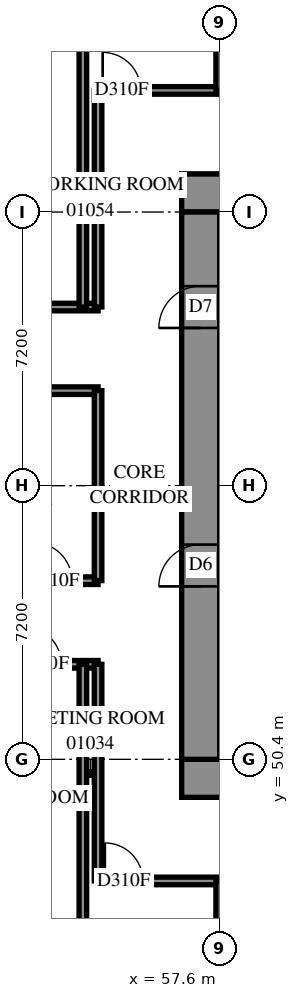
"""IFC4 building model, lengths in metres.
Left out: names, types, materials, properties, quantities, classifications, styles, units other than length and angle.
Written with IfcOpenShell. Run it as: python <this file> out.ifc"""

import sys

from ifc_helpers import new_model, si_unit, direction, frame, frame_2d, origin, place, context, subcontext, project, spatial, rectangle, extrude, element, fill, save


model = new_model("IFC4")
c1 = context("Model", 3, precision=1e-05, world=origin(), true_north=direction((0.0, 1.0)))
c2 = subcontext(c1, "Body", "Model", "MODEL_VIEW")
j1 = project(units=[si_unit("LENGTHUNIT", "METRE"), si_unit("PLANEANGLEUNIT", "RADIAN")], contexts=[c1])
p1 = place(None, origin())
s1 = spatial("IfcSite", under=j1, at=p1, CompositionType="ELEMENT")
p2 = place(p1, origin())
s2 = spatial("IfcBuilding", under=s1, at=p2, CompositionType="ELEMENT")
p3 = place(p2, frame((0.0, 0.0, 6.0)))
s3 = spatial("IfcBuildingStorey", under=s2, at=p3, CompositionType="ELEMENT", Elevation=6.0)
p4 = place(p3, frame((56.6, 49.9, -0.4), z_axis=(0.0, 0.0, 1.0), x_axis=(1.0, 0.0, 0.0)))
e1 = element("IfcWall", 1, at=p4, inside=s3, PredefinedType="SHEAR", context=c2, shape_type="SweptSolid", body=[
    extrude(rectangle(XDim=16.4, YDim=1.0, at=frame_2d((8.2, 0.0))), origin(), (0.0, 0.0, 1.0), 3.5),
])
p5 = place(p3, frame((56.6, 65.3, -0.4), z_axis=(0.0, 0.0, 1.0), x_axis=(1.0, 0.0, 0.0)))
e2 = element("IfcWall", 2, at=p5, inside=s3, PredefinedType="SHEAR", context=c2, shape_type="SweptSolid", body=[
    extrude(rectangle(XDim=16.4, YDim=1.0, at=frame_2d((8.2, 0.0))), origin(), (0.0, 0.0, 1.0), 3.5),
])
p6 = place(p5, frame((11.0, 0.0, 0.4)))
e3 = element("IfcOpeningElement", 3, at=p6, cuts=e2, PredefinedType="OPENING", context=c2, shape_type="SweptSolid", body=[
    extrude(rectangle(XDim=0.8, YDim=2.1, at=frame_2d((0.4, 1.05))), frame((0.0, 0.51, 0.0), z_axis=(0.0, -1.0, 0.0), x_axis=(1.0, 0.0, 0.0)), (0.0, 0.0, 1.0), 1.02),
])
p7 = place(p3, frame((57.1, 50.4, -0.4), z_axis=(0.0, 0.0, 1.0), x_axis=(0.0, 1.0, 0.0)))
e4 = element("IfcWall", 4, at=p7, inside=s3, PredefinedType="SHEAR", context=c2, shape_type="SweptSolid", body=[
    extrude(rectangle(XDim=14.4, YDim=1.0, at=frame_2d((7.2, 0.0))), origin(), (0.0, 0.0, 1.0), 3.5),
])
p8 = place(p7, frame((4.55, 0.0, 0.4)))
e5 = element("IfcOpeningElement", 5, at=p8, cuts=e4, PredefinedType="OPENING", context=c2, shape_type="SweptSolid", body=[
    extrude(rectangle(XDim=1.1, YDim=2.1, at=frame_2d((0.55, 1.05))), frame((0.0, 0.51, 0.0), z_axis=(0.0, -1.0, 0.0), x_axis=(1.0, 0.0, 0.0)), (0.0, 0.0, 1.0), 1.02),
])
p9 = place(p7, frame((11.35, 0.0, 0.4)))
e6 = element("IfcOpeningElement", 6, at=p9, cuts=e4, PredefinedType="OPENING", context=c2, shape_type="SweptSolid", body=[
    extrude(rectangle(XDim=1.1, YDim=2.1, at=frame_2d((0.55, 1.05))), frame((0.0, 0.51, 0.0), z_axis=(0.0, -1.0, 0.0), x_axis=(1.0, 0.0, 0.0)), (0.0, 0.0, 1.0), 1.02),
])
p10 = place(p3, frame((0.0, 55.1, 0.0), z_axis=(0.0, 0.0, 1.0), x_axis=(1.0, 0.0, 0.0)))
e7 = element("IfcWall", 7, at=p10, inside=s3, PredefinedType="PARTITIONING", context=c2, shape_type="SweptSolid", body=[
    extrude(rectangle(XDim=54.4, YDim=0.2, at=frame_2d((27.2, 0.0))), origin(), (0.0, 0.0, 1.0), 3.8),
])
p11 = place(p10, frame((10.485, 0.0, 0.0)))
e8 = element("IfcOpeningElement", 8, at=p11, cuts=e7, PredefinedType="OPENING", context=c2, shape_type="SweptSolid", body=[
    extrude(rectangle(XDim=1.0, YDim=2.1, at=frame_2d((0.5, 1.05))), frame((0.0, 0.11, 0.0), z_axis=(0.0, -1.0, 0.0), x_axis=(1.0, 0.0, 0.0)), (0.0, 0.0, 1.0), 0.22),
])
p12 = place(p10, frame((16.475, 0.0, 0.0)))
e9 = element("IfcOpeningElement", 9, at=p12, cuts=e7, PredefinedType="OPENING", context=c2, shape_type="SweptSolid", body=[
    extrude(rectangle(XDim=1.0, YDim=2.1, at=frame_2d((0.5, 1.05))), frame((0.0, 0.11, 0.0), z_axis=(0.0, -1.0, 0.0), x_axis=(1.0, 0.0, 0.0)), (0.0, 0.0, 1.0), 0.22),
])
p13 = place(p10, frame((22.025, 0.0, 0.0)))
e10 = element("IfcOpeningElement", 10, at=p13, cuts=e7, PredefinedType="OPENING", context=c2, shape_type="SweptSolid", body=[
    extrude(rectangle(XDim=1.0, YDim=2.1, at=frame_2d((0.5, 1.05))), frame((0.0, 0.11, 0.0), z_axis=(0.0, -1.0, 0.0), x_axis=(1.0, 0.0, 0.0)), (0.0, 0.0, 1.0), 0.22),
])
p14 = place(p10, frame((34.484, 0.0, 0.0)))
e11 = element("IfcOpeningElement", 11, at=p14, cuts=e7, PredefinedType="OPENING", context=c2, shape_type="SweptSolid", body=[
    extrude(rectangle(XDim=1.0, YDim=2.1, at=frame_2d((0.5, 1.05))), frame((0.0, 0.11, 0.0), z_axis=(0.0, -1.0, 0.0), x_axis=(1.0, 0.0, 0.0)), (0.0, 0.0, 1.0), 0.22),
])
p15 = place(p10, frame((40.125, 0.0, 0.0)))
e12 = element("IfcOpeningElement", 12, at=p15, cuts=e7, PredefinedType="OPENING", context=c2, shape_type="SweptSolid", body=[
    extrude(rectangle(XDim=1.0, YDim=2.1, at=frame_2d((0.5, 1.05))), frame((0.0, 0.11, 0.0), z_axis=(0.0, -1.0, 0.0), x_axis=(1.0, 0.0, 0.0)), (0.0, 0.0, 1.0), 0.22),
])
p16 = place(p10, frame((47.086, 0.0, 0.0)))
e13 = element("IfcOpeningElement", 13, at=p16, cuts=e7, PredefinedType="OPENING", context=c2, shape_type="SweptSolid", body=[
    extrude(rectangle(XDim=1.0, YDim=2.1, at=frame_2d((0.5, 1.05))), frame((0.0, 0.11, 0.0), z_axis=(0.0, -1.0, 0.0), x_axis=(1.0, 0.0, 0.0)), (0.0, 0.0, 1.0), 0.22),
])
p17 = place(p10, frame((52.709, 0.0, 0.0)))
e14 = element("IfcOpeningElement", 14, at=p17, cuts=e7, PredefinedType="OPENING", context=c2, shape_type="SweptSolid", body=[
    extrude(rectangle(XDim=1.0, YDim=2.1, at=frame_2d((0.5, 1.05))), frame((0.0, 0.11, 0.0), z_axis=(0.0, -1.0, 0.0), x_axis=(1.0, 0.0, 0.0)), (0.0, 0.0, 1.0), 0.22),
])
p18 = place(p10, frame((2.451, 0.0, 0.0)))
e15 = element("IfcOpeningElement", 15, at=p18, cuts=e7, PredefinedType="OPENING", context=c2, shape_type="SweptSolid", body=[
    extrude(rectangle(XDim=1.0, YDim=2.1, at=frame_2d((0.5, 1.05))), frame((0.0, 0.11, 0.0), z_axis=(0.0, -1.0, 0.0), x_axis=(1.0, 0.0, 0.0)), (0.0, 0.0, 1.0), 0.22),
])
p19 = place(p3, frame((0.0, 52.9, 0.0), z_axis=(0.0, 0.0, 1.0), x_axis=(1.0, 0.0, 0.0)))
e16 = element("IfcWall", 16, at=p19, inside=s3, PredefinedType="PARTITIONING", context=c2, shape_type="SweptSolid", body=[
    extrude(rectangle(XDim=54.4, YDim=0.2, at=frame_2d((27.2, 0.0))), origin(), (0.0, 0.0, 1.0), 3.8),
])
p20 = place(p19, frame((8.689, 0.0, 0.0)))
e17 = element("IfcOpeningElement", 17, at=p20, cuts=e16, PredefinedType="OPENING", context=c2, shape_type="SweptSolid", body=[
    extrude(rectangle(XDim=1.0, YDim=2.1, at=frame_2d((0.5, 1.05))), frame((0.0, 0.11, 0.0), z_axis=(0.0, -1.0, 0.0), x_axis=(1.0, 0.0, 0.0)), (0.0, 0.0, 1.0), 0.22),
])
p21 = place(p19, frame((11.325, 0.0, 0.0)))
e18 = element("IfcOpeningElement", 18, at=p21, cuts=e16, PredefinedType="OPENING", context=c2, shape_type="SweptSolid", body=[
    extrude(rectangle(XDim=1.0, YDim=2.1, at=frame_2d((0.5, 1.05))), frame((0.0, 0.11, 0.0), z_axis=(0.0, -1.0, 0.0), x_axis=(1.0, 0.0, 0.0)), (0.0, 0.0, 1.0), 0.22),
])
p22 = place(p19, frame((18.262, 0.0, 0.0)))
e19 = element("IfcOpeningElement", 19, at=p22, cuts=e16, PredefinedType="OPENING", context=c2, shape_type="SweptSolid", body=[
    extrude(rectangle(XDim=1.0, YDim=2.1, at=frame_2d((0.5, 1.05))), frame((0.0, 0.11, 0.0), z_axis=(0.0, -1.0, 0.0), x_axis=(1.0, 0.0, 0.0)), (0.0, 0.0, 1.0), 0.22),
])
p23 = place(p19, frame((23.633, 0.0, 0.0)))
e20 = element("IfcOpeningElement", 20, at=p23, cuts=e16, PredefinedType="OPENING", context=c2, shape_type="SweptSolid", body=[
    extrude(rectangle(XDim=1.0, YDim=2.1, at=frame_2d((0.5, 1.05))), frame((0.0, 0.11, 0.0), z_axis=(0.0, -1.0, 0.0), x_axis=(1.0, 0.0, 0.0)), (0.0, 0.0, 1.0), 0.22),
])
p24 = place(p19, frame((27.538, 0.0, 0.0)))
e21 = element("IfcOpeningElement", 21, at=p24, cuts=e16, PredefinedType="OPENING", context=c2, shape_type="SweptSolid", body=[
    extrude(rectangle(XDim=1.0, YDim=2.1, at=frame_2d((0.5, 1.05))), frame((0.0, 0.11, 0.0), z_axis=(0.0, -1.0, 0.0), x_axis=(1.0, 0.0, 0.0)), (0.0, 0.0, 1.0), 0.22),
])
p25 = place(p19, frame((32.907, 0.0, 0.0)))
e22 = element("IfcOpeningElement", 22, at=p25, cuts=e16, PredefinedType="OPENING", context=c2, shape_type="SweptSolid", body=[
    extrude(rectangle(XDim=1.0, YDim=2.1, at=frame_2d((0.5, 1.05))), frame((0.0, 0.11, 0.0), z_axis=(0.0, -1.0, 0.0), x_axis=(1.0, 0.0, 0.0)), (0.0, 0.0, 1.0), 0.22),
])
p26 = place(p19, frame((38.032, 0.0, 0.0)))
e23 = element("IfcOpeningElement", 23, at=p26, cuts=e16, PredefinedType="OPENING", context=c2, shape_type="SweptSolid", body=[
    extrude(rectangle(XDim=1.0, YDim=2.1, at=frame_2d((0.5, 1.05))), frame((0.0, 0.11, 0.0), z_axis=(0.0, -1.0, 0.0), x_axis=(1.0, 0.0, 0.0)), (0.0, 0.0, 1.0), 0.22),
])
p27 = place(p19, frame((41.938, 0.0, 0.0)))
e24 = element("IfcOpeningElement", 24, at=p27, cuts=e16, PredefinedType="OPENING", context=c2, shape_type="SweptSolid", body=[
    extrude(rectangle(XDim=1.0, YDim=2.1, at=frame_2d((0.5, 1.05))), frame((0.0, 0.11, 0.0), z_axis=(0.0, -1.0, 0.0), x_axis=(1.0, 0.0, 0.0)), (0.0, 0.0, 1.0), 0.22),
])
p28 = place(p19, frame((47.307, 0.0, 0.0)))
e25 = element("IfcOpeningElement", 25, at=p28, cuts=e16, PredefinedType="OPENING", context=c2, shape_type="SweptSolid", body=[
    extrude(rectangle(XDim=1.0, YDim=2.1, at=frame_2d((0.5, 1.05))), frame((0.0, 0.11, 0.0), z_axis=(0.0, -1.0, 0.0), x_axis=(1.0, 0.0, 0.0)), (0.0, 0.0, 1.0), 0.22),
])
p29 = place(p19, frame((52.432, 0.0, 0.0)))
e26 = element("IfcOpeningElement", 26, at=p29, cuts=e16, PredefinedType="OPENING", context=c2, shape_type="SweptSolid", body=[
    extrude(rectangle(XDim=1.0, YDim=2.1, at=frame_2d((0.5, 1.05))), frame((0.0, 0.11, 0.0), z_axis=(0.0, -1.0, 0.0), x_axis=(1.0, 0.0, 0.0)), (0.0, 0.0, 1.0), 0.22),
])
p30 = place(p19, frame((2.288, 0.0, 0.0)))
e27 = element("IfcOpeningElement", 27, at=p30, cuts=e16, PredefinedType="OPENING", context=c2, shape_type="SweptSolid", body=[
    extrude(rectangle(XDim=1.0, YDim=2.1, at=frame_2d((0.5, 1.05))), frame((0.0, 0.11, 0.0), z_axis=(0.0, -1.0, 0.0), x_axis=(1.0, 0.0, 0.0)), (0.0, 0.0, 1.0), 0.22),
])
p31 = place(p19, frame((4.772, 0.0, 0.0)))
e28 = element("IfcOpeningElement", 28, at=p31, cuts=e16, PredefinedType="OPENING", context=c2, shape_type="SweptSolid", body=[
    extrude(rectangle(XDim=1.0, YDim=2.1, at=frame_2d((0.5, 1.05))), frame((0.0, 0.11, 0.0), z_axis=(0.0, -1.0, 0.0), x_axis=(1.0, 0.0, 0.0)), (0.0, 0.0, 1.0), 0.22),
])
p32 = place(p3, frame((0.002, 60.1, 0.0), z_axis=(0.0, 0.0, 1.0), x_axis=(1.0, 0.0, 0.0)))
e29 = element("IfcWall", 29, at=p32, inside=s3, PredefinedType="PARTITIONING", context=c2, shape_type="SweptSolid", body=[
    extrude(rectangle(XDim=54.398, YDim=0.2, at=frame_2d((27.199, 0.0))), origin(), (0.0, 0.0, 1.0), 3.8),
])
p33 = place(p32, frame((3.729, 0.0, 0.0)))
e30 = element("IfcOpeningElement", 30, at=p33, cuts=e29, PredefinedType="OPENING", context=c2, shape_type="SweptSolid", body=[
    extrude(rectangle(XDim=1.0, YDim=2.1, at=frame_2d((0.5, 1.05))), frame((0.0, 0.11, 0.0), z_axis=(0.0, -1.0, 0.0), x_axis=(1.0, 0.0, 0.0)), (0.0, 0.0, 1.0), 0.22),
])
p34 = place(p3, frame((0.002, 62.3, 0.0), z_axis=(0.0, 0.0, 1.0), x_axis=(1.0, 0.0, 0.0)))
e31 = element("IfcWall", 31, at=p34, inside=s3, PredefinedType="PARTITIONING", context=c2, shape_type="SweptSolid", body=[
    extrude(rectangle(XDim=54.398, YDim=0.2, at=frame_2d((27.199, 0.0))), origin(), (0.0, 0.0, 1.0), 3.8),
])
p35 = place(p34, frame((8.667, 0.0, 0.0)))
e32 = element("IfcOpeningElement", 32, at=p35, cuts=e31, PredefinedType="OPENING", context=c2, shape_type="SweptSolid", body=[
    extrude(rectangle(XDim=1.0, YDim=2.1, at=frame_2d((0.5, 1.05))), frame((0.0, 0.11, 0.0), z_axis=(0.0, -1.0, 0.0), x_axis=(1.0, 0.0, 0.0)), (0.0, 0.0, 1.0), 0.22),
])
p36 = place(p34, frame((13.136, 0.0, 0.0)))
e33 = element("IfcOpeningElement", 33, at=p36, cuts=e31, PredefinedType="OPENING", context=c2, shape_type="SweptSolid", body=[
    extrude(rectangle(XDim=1.0, YDim=2.1, at=frame_2d((0.5, 1.05))), frame((0.0, 0.11, 0.0), z_axis=(0.0, -1.0, 0.0), x_axis=(1.0, 0.0, 0.0)), (0.0, 0.0, 1.0), 0.22),
])
p37 = place(p34, frame((18.566, 0.0, 0.0)))
e34 = element("IfcOpeningElement", 34, at=p37, cuts=e31, PredefinedType="OPENING", context=c2, shape_type="SweptSolid", body=[
    extrude(rectangle(XDim=1.0, YDim=2.1, at=frame_2d((0.5, 1.05))), frame((0.0, 0.11, 0.0), z_axis=(0.0, -1.0, 0.0), x_axis=(1.0, 0.0, 0.0)), (0.0, 0.0, 1.0), 0.22),
])
p38 = place(p34, frame((27.256, 0.0, 0.0)))
e35 = element("IfcOpeningElement", 35, at=p38, cuts=e31, PredefinedType="OPENING", context=c2, shape_type="SweptSolid", body=[
    extrude(rectangle(XDim=1.0, YDim=2.1, at=frame_2d((0.5, 1.05))), frame((0.0, 0.11, 0.0), z_axis=(0.0, -1.0, 0.0), x_axis=(1.0, 0.0, 0.0)), (0.0, 0.0, 1.0), 0.22),
])
p39 = place(p34, frame((34.736, 0.0, 0.0)))
e36 = element("IfcOpeningElement", 36, at=p39, cuts=e31, PredefinedType="OPENING", context=c2, shape_type="SweptSolid", body=[
    extrude(rectangle(XDim=1.0, YDim=2.1, at=frame_2d((0.5, 1.05))), frame((0.0, 0.11, 0.0), z_axis=(0.0, -1.0, 0.0), x_axis=(1.0, 0.0, 0.0)), (0.0, 0.0, 1.0), 0.22),
])
p40 = place(p34, frame((40.166, 0.0, 0.0)))
e37 = element("IfcOpeningElement", 37, at=p40, cuts=e31, PredefinedType="OPENING", context=c2, shape_type="SweptSolid", body=[
    extrude(rectangle(XDim=1.0, YDim=2.1, at=frame_2d((0.5, 1.05))), frame((0.0, 0.11, 0.0), z_axis=(0.0, -1.0, 0.0), x_axis=(1.0, 0.0, 0.0)), (0.0, 0.0, 1.0), 0.22),
])
p41 = place(p34, frame((45.291, 0.0, 0.0)))
e38 = element("IfcOpeningElement", 38, at=p41, cuts=e31, PredefinedType="OPENING", context=c2, shape_type="SweptSolid", body=[
    extrude(rectangle(XDim=1.0, YDim=2.1, at=frame_2d((0.5, 1.05))), frame((0.0, 0.11, 0.0), z_axis=(0.0, -1.0, 0.0), x_axis=(1.0, 0.0, 0.0)), (0.0, 0.0, 1.0), 0.22),
])
p42 = place(p34, frame((49.136, 0.0, 0.0)))
e39 = element("IfcOpeningElement", 39, at=p42, cuts=e31, PredefinedType="OPENING", context=c2, shape_type="SweptSolid", body=[
    extrude(rectangle(XDim=1.0, YDim=2.1, at=frame_2d((0.5, 1.05))), frame((0.0, 0.11, 0.0), z_axis=(0.0, -1.0, 0.0), x_axis=(1.0, 0.0, 0.0)), (0.0, 0.0, 1.0), 0.22),
])
p43 = place(p34, frame((4.807, 0.0, 0.0)))
e40 = element("IfcOpeningElement", 40, at=p43, cuts=e31, PredefinedType="OPENING", context=c2, shape_type="SweptSolid", body=[
    extrude(rectangle(XDim=1.0, YDim=2.1, at=frame_2d((0.5, 1.05))), frame((0.0, 0.11, 0.0), z_axis=(0.0, -1.0, 0.0), x_axis=(1.0, 0.0, 0.0)), (0.0, 0.0, 1.0), 0.22),
])
p44 = place(p3, frame((54.4, 68.0, 0.0), z_axis=(0.0, 0.0, 1.0), x_axis=(1.0, 0.0, 0.0)))
e41 = element("IfcWall", 41, at=p44, inside=s3, PredefinedType="PARTITIONING", context=c2, shape_type="SweptSolid", body=[
    extrude(rectangle(XDim=20.8, YDim=0.2, at=frame_2d((10.4, 0.0))), origin(), (0.0, 0.0, 1.0), 3.8),
])
p45 = place(p44, frame((0.121, 0.0, 0.0)))
e42 = element("IfcOpeningElement", 42, at=p45, cuts=e41, PredefinedType="OPENING", context=c2, shape_type="SweptSolid", body=[
    extrude(rectangle(XDim=1.0, YDim=2.1, at=frame_2d((0.5, 1.05))), frame((0.0, 0.11, 0.0), z_axis=(0.0, -1.0, 0.0), x_axis=(1.0, 0.0, 0.0)), (0.0, 0.0, 1.0), 0.22),
])
p46 = place(p44, frame((19.622, 0.0, 0.0)))
e43 = element("IfcOpeningElement", 43, at=p46, cuts=e41, PredefinedType="OPENING", context=c2, shape_type="SweptSolid", body=[
    extrude(rectangle(XDim=1.0, YDim=2.1, at=frame_2d((0.5, 1.05))), frame((0.0, 0.11, 0.0), z_axis=(0.0, -1.0, 0.0), x_axis=(1.0, 0.0, 0.0)), (0.0, 0.0, 1.0), 0.22),
])
p47 = place(p44, frame((8.858, 0.0, 0.0)))
e44 = element("IfcOpeningElement", 44, at=p47, cuts=e41, PredefinedType="OPENING", context=c2, shape_type="SweptSolid", body=[
    extrude(rectangle(XDim=1.0, YDim=2.1, at=frame_2d((0.5, 1.05))), frame((0.0, 0.11, 0.0), z_axis=(0.0, -1.0, 0.0), x_axis=(1.0, 0.0, 0.0)), (0.0, 0.0, 1.0), 0.22),
])
p48 = place(p44, frame((14.568, 0.0, 0.0)))
e45 = element("IfcOpeningElement", 45, at=p48, cuts=e41, PredefinedType="OPENING", context=c2, shape_type="SweptSolid", body=[
    extrude(rectangle(XDim=1.0, YDim=2.1, at=frame_2d((0.5, 1.05))), frame((0.0, 0.11, 0.0), z_axis=(0.0, -1.0, 0.0), x_axis=(1.0, 0.0, 0.0)), (0.0, 0.0, 1.0), 0.22),
])
p49 = place(p3, frame((54.4, 47.2, 0.0), z_axis=(0.0, 0.0, 1.0), x_axis=(1.0, 0.0, 0.0)))
e46 = element("IfcWall", 46, at=p49, inside=s3, PredefinedType="PARTITIONING", context=c2, shape_type="SweptSolid", body=[
    extrude(rectangle(XDim=19.618, YDim=0.2, at=frame_2d((9.809, 0.0))), origin(), (0.0, 0.0, 1.0), 3.8),
])
p50 = place(p49, frame((0.178, 0.0, 0.0)))
e47 = element("IfcOpeningElement", 47, at=p50, cuts=e46, PredefinedType="OPENING", context=c2, shape_type="SweptSolid", body=[
    extrude(rectangle(XDim=1.0, YDim=2.1, at=frame_2d((0.5, 1.05))), frame((0.0, 0.11, 0.0), z_axis=(0.0, -1.0, 0.0), x_axis=(1.0, 0.0, 0.0)), (0.0, 0.0, 1.0), 0.22),
])
p51 = place(p49, frame((7.062, 0.0, 0.0)))
e48 = element("IfcOpeningElement", 48, at=p51, cuts=e46, PredefinedType="OPENING", context=c2, shape_type="SweptSolid", body=[
    extrude(rectangle(XDim=1.0, YDim=2.1, at=frame_2d((0.5, 1.05))), frame((0.0, 0.11, 0.0), z_axis=(0.0, -1.0, 0.0), x_axis=(1.0, 0.0, 0.0)), (0.0, 0.0, 1.0), 0.22),
])
p52 = place(p49, frame((14.262, 0.0, 0.0)))
e49 = element("IfcOpeningElement", 49, at=p52, cuts=e46, PredefinedType="OPENING", context=c2, shape_type="SweptSolid", body=[
    extrude(rectangle(XDim=1.0, YDim=2.1, at=frame_2d((0.5, 1.05))), frame((0.0, 0.11, 0.0), z_axis=(0.0, -1.0, 0.0), x_axis=(1.0, 0.0, 0.0)), (0.0, 0.0, 1.0), 0.22),
])
p53 = place(p3, frame((54.0, 42.0, 0.0), z_axis=(0.0, 0.0, 1.0), x_axis=(0.0, 1.0, 0.0)))
e50 = element("IfcWall", 50, at=p53, inside=s3, PredefinedType="PARTITIONING", context=c2, shape_type="SweptSolid", body=[
    extrude(rectangle(XDim=10.9, YDim=0.2, at=frame_2d((5.45, 0.0))), origin(), (0.0, 0.0, 1.0), 3.8),
])
p54 = place(p3, frame((54.0, 62.3, 0.0), z_axis=(0.0, 0.0, 1.0), x_axis=(0.0, 1.0, 0.0)))
e51 = element("IfcWall", 51, at=p54, inside=s3, PredefinedType="PARTITIONING", context=c2, shape_type="SweptSolid", body=[
    extrude(rectangle(XDim=10.7, YDim=0.2, at=frame_2d((5.35, 0.0))), origin(), (0.0, 0.0, 1.0), 3.8),
])
p55 = place(p3, frame((54.4, 47.2, 0.0), z_axis=(0.0, 0.0, 1.0), x_axis=(0.0, 1.0, 0.0)))
e52 = element("IfcWall", 52, at=p55, inside=s3, PredefinedType="PARTITIONING", context=c2, shape_type="SweptSolid", body=[
    extrude(rectangle(XDim=5.7, YDim=0.2, at=frame_2d((2.85, 0.0))), origin(), (0.0, 0.0, 1.0), 3.8),
])
p56 = place(p3, frame((54.4, 62.302, 0.0), z_axis=(0.0, 0.0, 1.0), x_axis=(0.0, 1.0, 0.0)))
e53 = element("IfcWall", 53, at=p56, inside=s3, PredefinedType="PARTITIONING", context=c2, shape_type="SweptSolid", body=[
    extrude(rectangle(XDim=5.698, YDim=0.2, at=frame_2d((2.849, 0.0))), origin(), (0.0, 0.0, 1.0), 3.8),
])
p57 = place(p3, frame((54.4, 55.102, 0.0), z_axis=(0.0, 0.0, 1.0), x_axis=(0.0, 1.0, 0.0)))
e54 = element("IfcWall", 54, at=p57, inside=s3, PredefinedType="PARTITIONING", context=c2, shape_type="SweptSolid", body=[
    extrude(rectangle(XDim=4.998, YDim=0.2, at=frame_2d((2.499, 0.0))), origin(), (0.0, 0.0, 1.0), 3.8),
])
for number, where, z_axis, x_axis in (
    (55, (57.6, 43.8, 0.0), (0.0, 0.0, 1.0), (0.0, 1.0, 0.0)),
    (56, (57.6, 68.0, 0.0), (0.0, 0.0, 1.0), (0.0, 1.0, 0.0)),
):
    element("IfcWall", number, at=place(p3, frame(where, z_axis=z_axis, x_axis=x_axis)), inside=s3, PredefinedType="PARTITIONING", context=c2, shape_type="SweptSolid", body=[
        extrude(rectangle(XDim=3.4, YDim=0.2, at=frame_2d((1.7, 0.0))), origin(), (0.0, 0.0, 1.0), 3.8),
    ])
p58 = place(p8, origin())
e57 = element("IfcDoor", 57, at=p58, inside=s3, OperationType="DOUBLE_DOOR_SINGLE_SWING", PredefinedType="DOOR", context=c2, shape_type="SweptSolid", body=[
    extrude(rectangle(XDim=1.1, YDim=2.1, at=frame_2d((0.55, 1.05))), frame((0.0, 0.025, 0.0), z_axis=(0.0, -1.0, 0.0), x_axis=(1.0, 0.0, 0.0)), (0.0, 0.0, 1.0), 0.05),
])
fill(e5, e57)
p59 = place(p9, origin())
e58 = element("IfcDoor", 58, at=p59, inside=s3, OperationType="SINGLE_SWING_LEFT", PredefinedType="DOOR", context=c2, shape_type="SweptSolid", body=[
    extrude(rectangle(XDim=1.1, YDim=2.1, at=frame_2d((0.55, 1.05))), frame((0.0, 0.025, 0.0), z_axis=(0.0, -1.0, 0.0), x_axis=(1.0, 0.0, 0.0)), (0.0, 0.0, 1.0), 0.05),
])
fill(e6, e58)
p60 = place(p29, origin())
e59 = element("IfcDoor", 59, at=p60, inside=s3, OperationType="SINGLE_SWING_LEFT", PredefinedType="DOOR", context=c2, shape_type="SweptSolid", body=[
    extrude(rectangle(XDim=1.0, YDim=2.1, at=frame_2d((0.5, 1.05))), frame((0.0, 0.025, 0.0), z_axis=(0.0, -1.0, 0.0), x_axis=(1.0, 0.0, 0.0)), (0.0, 0.0, 1.0), 0.05),
])
fill(e26, e59)
p61 = place(p50, origin())
e60 = element("IfcDoor", 60, at=p61, inside=s3, OperationType="SINGLE_SWING_RIGHT", PredefinedType="DOOR", context=c2, shape_type="SweptSolid", body=[
    extrude(rectangle(XDim=1.0, YDim=2.1, at=frame_2d((0.5, 1.05))), frame((0.0, 0.025, 0.0), z_axis=(0.0, -1.0, 0.0), x_axis=(1.0, 0.0, 0.0)), (0.0, 0.0, 1.0), 0.05),
])
fill(e47, e60)
p62 = place(p17, origin())
e61 = element("IfcDoor", 61, at=p62, inside=s3, OperationType="SINGLE_SWING_RIGHT", PredefinedType="DOOR", context=c2, shape_type="SweptSolid", body=[
    extrude(rectangle(XDim=1.0, YDim=2.1, at=frame_2d((0.5, 1.05))), frame((0.0, 0.025, 0.0), z_axis=(0.0, -1.0, 0.0), x_axis=(1.0, 0.0, 0.0)), (0.0, 0.0, 1.0), 0.05),
])
fill(e14, e61)
p63 = place(p45, origin())
e62 = element("IfcDoor", 62, at=p63, inside=s3, OperationType="SINGLE_SWING_LEFT", PredefinedType="DOOR", context=c2, shape_type="SweptSolid", body=[
    extrude(rectangle(XDim=1.0, YDim=2.1, at=frame_2d((0.5, 1.05))), frame((0.0, 0.025, 0.0), z_axis=(0.0, -1.0, 0.0), x_axis=(1.0, 0.0, 0.0)), (0.0, 0.0, 1.0), 0.05),
])
fill(e42, e62)
save(model, sys.argv[1])
